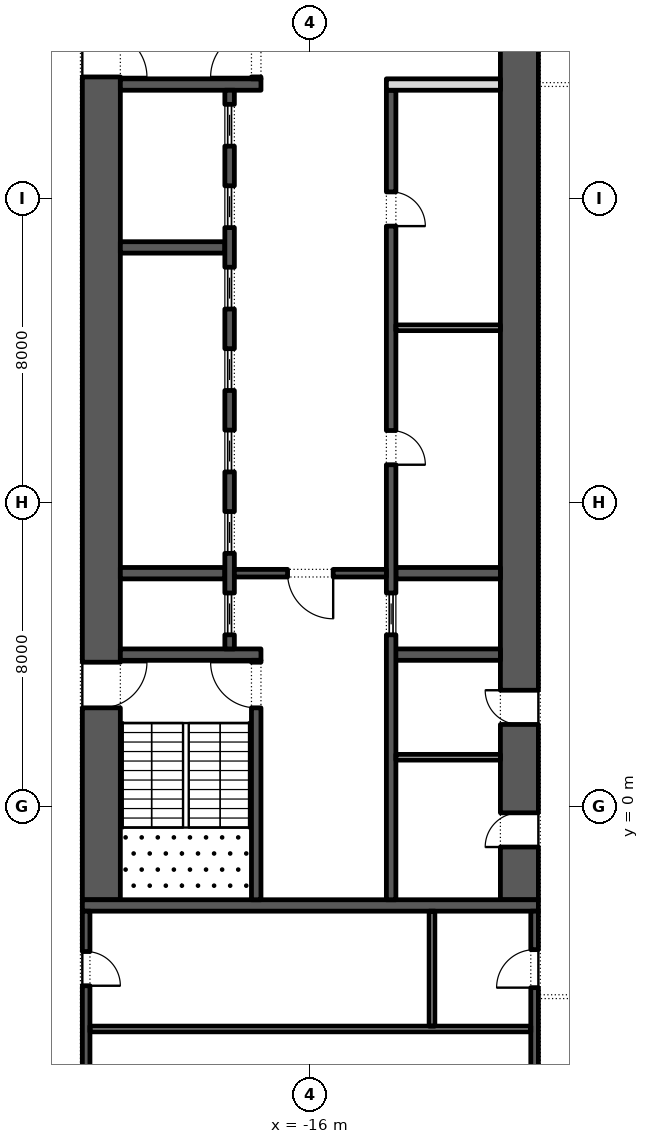
"""IFC4 building model, lengths in metres.
Left out: names, types, materials, properties, quantities, classifications, styles, units other than length and angle.
Written with IfcOpenShell. Run it as: python <this file> out.ifc"""

import sys

from ifc_helpers import new_model, si_unit, direction, frame, frame_2d, origin, place, context, subcontext, project, spatial, rectangle, extrude, element, fill, save


model = new_model("IFC4")
c1 = context("Model", 3, precision=1e-05, world=origin(), true_north=direction((0.0, 1.0)))
c2 = subcontext(c1, "Body", "Model", "MODEL_VIEW")
j1 = project(units=[si_unit("LENGTHUNIT", "METRE"), si_unit("PLANEANGLEUNIT", "RADIAN")], contexts=[c1])
p1 = place(None, origin())
s1 = spatial("IfcSite", under=j1, at=p1, CompositionType="ELEMENT")
p2 = place(p1, origin())
s2 = spatial("IfcBuilding", under=s1, at=p2, CompositionType="ELEMENT")
p3 = place(p2, frame((0.0, 0.0, 56.4)))
s3 = spatial("IfcBuildingStorey", under=s2, at=p3, CompositionType="ELEMENT", Elevation=56.4)
p4 = place(p3, frame((-21.5, -2.45, 0.0), z_axis=(0.0, 0.0, 1.0), x_axis=(0.0, 1.0, 0.0)))
e1 = element("IfcWall", 1, at=p4, inside=s3, PredefinedType="SHEAR", context=c2, shape_type="SweptSolid", body=[
    extrude(rectangle(XDim=27.9, YDim=1.0, at=frame_2d((13.95, 0.0))), origin(), (0.0, 0.0, 1.0), 4.0),
])
p5 = place(p4, frame((5.05, 0.0, 0.0)))
e2 = element("IfcOpeningElement", 2, at=p5, cuts=e1, PredefinedType="OPENING", context=c2, shape_type="SweptSolid", body=[
    extrude(rectangle(XDim=1.2, YDim=2.1, at=frame_2d((0.6, 1.05))), frame((0.0, 0.51, 0.0), z_axis=(0.0, -1.0, 0.0), x_axis=(1.0, 0.0, 0.0)), (0.0, 0.0, 1.0), 1.02),
])
p6 = place(p4, frame((21.65, 0.0, 0.0)))
e3 = element("IfcOpeningElement", 3, at=p6, cuts=e1, PredefinedType="OPENING", context=c2, shape_type="SweptSolid", body=[
    extrude(rectangle(XDim=1.2, YDim=2.1, at=frame_2d((0.6, 1.05))), frame((0.0, 0.51, 0.0), z_axis=(0.0, -1.0, 0.0), x_axis=(1.0, 0.0, 0.0)), (0.0, 0.0, 1.0), 1.02),
])
p7 = place(p3, frame((-10.5, -2.45, 0.0), z_axis=(0.0, 0.0, 1.0), x_axis=(0.0, 1.0, 0.0)))
e4 = element("IfcWall", 4, at=p7, inside=s3, PredefinedType="SHEAR", context=c2, shape_type="SweptSolid", body=[
    extrude(rectangle(XDim=27.9, YDim=1.0, at=frame_2d((13.95, 0.0))), origin(), (0.0, 0.0, 1.0), 4.0),
])
p8 = place(p7, frame((23.65, 0.0, 0.0)))
e5 = element("IfcOpeningElement", 5, at=p8, cuts=e4, PredefinedType="OPENING", context=c2, shape_type="SweptSolid", body=[
    extrude(rectangle(XDim=2.4, YDim=2.1, at=frame_2d((1.2, 1.05))), frame((0.0, 0.51, 0.0), z_axis=(0.0, -1.0, 0.0), x_axis=(1.0, 0.0, 0.0)), (0.0, 0.0, 1.0), 1.02),
])
p9 = place(p7, frame((1.387, 0.0, 0.0)))
e6 = element("IfcOpeningElement", 6, at=p9, cuts=e4, PredefinedType="OPENING", context=c2, shape_type="SweptSolid", body=[
    extrude(rectangle(XDim=0.9, YDim=2.1, at=frame_2d((0.45, 1.05))), frame((0.0, 0.51, 0.0), z_axis=(0.0, -1.0, 0.0), x_axis=(1.0, 0.0, 0.0)), (0.0, 0.0, 1.0), 1.02),
])
p10 = place(p7, frame((4.613, 0.0, 0.0)))
e7 = element("IfcOpeningElement", 7, at=p10, cuts=e4, PredefinedType="OPENING", context=c2, shape_type="SweptSolid", body=[
    extrude(rectangle(XDim=0.9, YDim=2.1, at=frame_2d((0.45, 1.05))), frame((0.0, 0.51, 0.0), z_axis=(0.0, -1.0, 0.0), x_axis=(1.0, 0.0, 0.0)), (0.0, 0.0, 1.0), 1.02),
])
p11 = place(p3, frame((-22.0, -2.6, 0.0), z_axis=(0.0, 0.0, 1.0), x_axis=(1.0, 0.0, 0.0)))
e8 = element("IfcWall", 8, at=p11, inside=s3, PredefinedType="SHEAR", context=c2, shape_type="SweptSolid", body=[
    extrude(rectangle(XDim=12.0, YDim=0.3, at=frame_2d((6.0, 0.0))), origin(), (0.0, 0.0, 1.0), 4.0),
])
p12 = place(p3, frame((-21.0, 4.0, 0.0), z_axis=(0.0, 0.0, 1.0), x_axis=(1.0, 0.0, 0.0)))
e9 = element("IfcWall", 9, at=p12, inside=s3, PredefinedType="SHEAR", context=c2, shape_type="SweptSolid", body=[
    extrude(rectangle(XDim=3.7, YDim=0.3, at=frame_2d((1.85, 0.0))), origin(), (0.0, 0.0, 1.0), 4.0),
])
p13 = place(p3, frame((-17.425, -2.45, 0.0), z_axis=(0.0, 0.0, 1.0), x_axis=(0.0, 1.0, 0.0)))
e10 = element("IfcWall", 10, at=p13, inside=s3, PredefinedType="SHEAR", context=c2, shape_type="SweptSolid", body=[
    extrude(rectangle(XDim=6.3, YDim=0.25, at=frame_2d((3.15, 0.0))), origin(), (0.0, 0.0, 1.0), 4.0),
])
p14 = place(p13, frame((5.05, 0.0, 0.0)))
e11 = element("IfcOpeningElement", 11, at=p14, cuts=e10, PredefinedType="OPENING", context=c2, shape_type="SweptSolid", body=[
    extrude(rectangle(XDim=1.2, YDim=2.1, at=frame_2d((0.6, 1.05))), frame((0.0, 0.135, 0.0), z_axis=(0.0, -1.0, 0.0), x_axis=(1.0, 0.0, 0.0)), (0.0, 0.0, 1.0), 0.27),
])
p15 = place(p3, frame((-21.0, 19.0, 0.0), z_axis=(0.0, 0.0, 1.0), x_axis=(1.0, 0.0, 0.0)))
e12 = element("IfcWall", 12, at=p15, inside=s3, PredefinedType="SHEAR", context=c2, shape_type="SweptSolid", body=[
    extrude(rectangle(XDim=3.7, YDim=0.3, at=frame_2d((1.85, 0.0))), origin(), (0.0, 0.0, 1.0), 4.0),
])
p16 = place(p3, frame((-17.425, 19.15, 0.0), z_axis=(0.0, 0.0, 1.0), x_axis=(0.0, 1.0, 0.0)))
e13 = element("IfcWall", 13, at=p16, inside=s3, PredefinedType="SHEAR", context=c2, shape_type="SweptSolid", body=[
    extrude(rectangle(XDim=6.3, YDim=0.25, at=frame_2d((3.15, 0.0))), origin(), (0.0, 0.0, 1.0), 4.0),
])
p17 = place(p16, frame((0.05, 0.0, 0.0)))
e14 = element("IfcOpeningElement", 14, at=p17, cuts=e13, PredefinedType="OPENING", context=c2, shape_type="SweptSolid", body=[
    extrude(rectangle(XDim=1.2, YDim=2.1, at=frame_2d((0.6, 1.05))), frame((0.0, 0.135, 0.0), z_axis=(0.0, -1.0, 0.0), x_axis=(1.0, 0.0, 0.0)), (0.0, 0.0, 1.0), 0.27),
])
for number, where, z_axis, x_axis in (
    (15, (-21.0, 6.143, 0.0), (0.0, 0.0, 1.0), (1.0, 0.0, 0.0)),
    (16, (-21.0, 14.714, 0.0), (0.0, 0.0, 1.0), (1.0, 0.0, 0.0)),
):
    element("IfcWall", number, at=place(p3, frame(where, z_axis=z_axis, x_axis=x_axis)), inside=s3, PredefinedType="SHEAR", context=c2, shape_type="SweptSolid", body=[
        extrude(rectangle(XDim=2.75, YDim=0.3, at=frame_2d((1.375, 0.0))), origin(), (0.0, 0.0, 1.0), 4.0),
    ])
p18 = place(p3, frame((-18.125, 4.15, 0.0), z_axis=(0.0, 0.0, 1.0), x_axis=(0.0, 1.0, 0.0)))
e17 = element("IfcWall", 17, at=p18, inside=s3, PredefinedType="SHEAR", context=c2, shape_type="SweptSolid", body=[
    extrude(rectangle(XDim=14.7, YDim=0.25, at=frame_2d((7.35, 0.0))), origin(), (0.0, 0.0, 1.0), 4.0),
])
p19 = place(p18, frame((0.371, 0.0, 0.0)))
e18 = element("IfcOpeningElement", 18, at=p19, cuts=e17, PredefinedType="OPENING", context=c2, shape_type="SweptSolid", body=[
    extrude(rectangle(XDim=1.1, YDim=2.1, at=frame_2d((0.55, 1.05))), frame((0.0, 0.135, 0.0), z_axis=(0.0, -1.0, 0.0), x_axis=(1.0, 0.0, 0.0)), (0.0, 0.0, 1.0), 0.27),
])
p20 = place(p18, frame((2.514, 0.0, 0.0)))
e19 = element("IfcOpeningElement", 19, at=p20, cuts=e17, PredefinedType="OPENING", context=c2, shape_type="SweptSolid", body=[
    extrude(rectangle(XDim=1.1, YDim=2.1, at=frame_2d((0.55, 1.05))), frame((0.0, 0.135, 0.0), z_axis=(0.0, -1.0, 0.0), x_axis=(1.0, 0.0, 0.0)), (0.0, 0.0, 1.0), 0.27),
])
p21 = place(p18, frame((4.657, 0.0, 0.0)))
e20 = element("IfcOpeningElement", 20, at=p21, cuts=e17, PredefinedType="OPENING", context=c2, shape_type="SweptSolid", body=[
    extrude(rectangle(XDim=1.1, YDim=2.1, at=frame_2d((0.55, 1.05))), frame((0.0, 0.135, 0.0), z_axis=(0.0, -1.0, 0.0), x_axis=(1.0, 0.0, 0.0)), (0.0, 0.0, 1.0), 0.27),
])
p22 = place(p18, frame((6.8, 0.0, 0.0)))
e21 = element("IfcOpeningElement", 21, at=p22, cuts=e17, PredefinedType="OPENING", context=c2, shape_type="SweptSolid", body=[
    extrude(rectangle(XDim=1.1, YDim=2.1, at=frame_2d((0.55, 1.05))), frame((0.0, 0.135, 0.0), z_axis=(0.0, -1.0, 0.0), x_axis=(1.0, 0.0, 0.0)), (0.0, 0.0, 1.0), 0.27),
])
p23 = place(p18, frame((8.943, 0.0, 0.0)))
e22 = element("IfcOpeningElement", 22, at=p23, cuts=e17, PredefinedType="OPENING", context=c2, shape_type="SweptSolid", body=[
    extrude(rectangle(XDim=1.1, YDim=2.1, at=frame_2d((0.55, 1.05))), frame((0.0, 0.135, 0.0), z_axis=(0.0, -1.0, 0.0), x_axis=(1.0, 0.0, 0.0)), (0.0, 0.0, 1.0), 0.27),
])
p24 = place(p18, frame((11.086, 0.0, 0.0)))
e23 = element("IfcOpeningElement", 23, at=p24, cuts=e17, PredefinedType="OPENING", context=c2, shape_type="SweptSolid", body=[
    extrude(rectangle(XDim=1.1, YDim=2.1, at=frame_2d((0.55, 1.05))), frame((0.0, 0.135, 0.0), z_axis=(0.0, -1.0, 0.0), x_axis=(1.0, 0.0, 0.0)), (0.0, 0.0, 1.0), 0.27),
])
p25 = place(p18, frame((13.229, 0.0, 0.0)))
e24 = element("IfcOpeningElement", 24, at=p25, cuts=e17, PredefinedType="OPENING", context=c2, shape_type="SweptSolid", body=[
    extrude(rectangle(XDim=1.1, YDim=2.1, at=frame_2d((0.55, 1.05))), frame((0.0, 0.135, 0.0), z_axis=(0.0, -1.0, 0.0), x_axis=(1.0, 0.0, 0.0)), (0.0, 0.0, 1.0), 0.27),
])
p26 = place(p3, frame((-14.0, 4.0, 0.0), z_axis=(0.0, 0.0, 1.0), x_axis=(1.0, 0.0, 0.0)))
e25 = element("IfcWall", 25, at=p26, inside=s3, PredefinedType="SHEAR", context=c2, shape_type="SweptSolid", body=[
    extrude(rectangle(XDim=3.0, YDim=0.3, at=frame_2d((1.5, 0.0))), origin(), (0.0, 0.0, 1.0), 4.0),
])
p27 = place(p3, frame((-13.75, 6.143, 0.0), z_axis=(0.0, 0.0, 1.0), x_axis=(1.0, 0.0, 0.0)))
e26 = element("IfcWall", 26, at=p27, inside=s3, PredefinedType="SHEAR", context=c2, shape_type="SweptSolid", body=[
    extrude(rectangle(XDim=2.75, YDim=0.3, at=frame_2d((1.375, 0.0))), origin(), (0.0, 0.0, 1.0), 4.0),
])
p28 = place(p3, frame((-13.875, -2.45, 0.0), z_axis=(0.0, 0.0, 1.0), x_axis=(0.0, 1.0, 0.0)))
e27 = element("IfcWall", 27, at=p28, inside=s3, PredefinedType="SHEAR", context=c2, shape_type="SweptSolid", body=[
    extrude(rectangle(XDim=21.3, YDim=0.25, at=frame_2d((10.65, 0.0))), origin(), (0.0, 0.0, 1.0), 4.0),
])
p29 = place(p28, frame((11.446, 0.0, 0.0)))
e28 = element("IfcOpeningElement", 28, at=p29, cuts=e27, PredefinedType="OPENING", context=c2, shape_type="SweptSolid", body=[
    extrude(rectangle(XDim=0.9, YDim=2.1, at=frame_2d((0.45, 1.05))), frame((0.0, 0.135, 0.0), z_axis=(0.0, -1.0, 0.0), x_axis=(1.0, 0.0, 0.0)), (0.0, 0.0, 1.0), 0.27),
])
p30 = place(p28, frame((17.725, 0.0, 0.0)))
e29 = element("IfcOpeningElement", 29, at=p30, cuts=e27, PredefinedType="OPENING", context=c2, shape_type="SweptSolid", body=[
    extrude(rectangle(XDim=0.9, YDim=2.1, at=frame_2d((0.45, 1.05))), frame((0.0, 0.135, 0.0), z_axis=(0.0, -1.0, 0.0), x_axis=(1.0, 0.0, 0.0)), (0.0, 0.0, 1.0), 0.27),
])
p31 = place(p28, frame((6.971, 0.0, 0.0)))
e30 = element("IfcOpeningElement", 30, at=p31, cuts=e27, PredefinedType="OPENING", context=c2, shape_type="SweptSolid", body=[
    extrude(rectangle(XDim=1.1, YDim=2.1, at=frame_2d((0.55, 1.05))), frame((0.0, 0.135, 0.0), z_axis=(0.0, -1.0, 0.0), x_axis=(1.0, 0.0, 0.0)), (0.0, 0.0, 1.0), 0.27),
])
p32 = place(p3, frame((-14.0, 19.0, 0.0), z_axis=(0.0, 0.0, 1.0), x_axis=(1.0, 0.0, 0.0)))
e31 = element("IfcWall", 31, at=p32, inside=s3, PredefinedType="PARTITIONING", context=c2, shape_type="SweptSolid", body=[
    extrude(rectangle(XDim=3.0, YDim=0.3, at=frame_2d((1.5, 0.0))), origin(), (0.0, 0.0, 1.0), 4.0),
])
p33 = place(p3, frame((-13.75, 12.6, 0.0), z_axis=(0.0, 0.0, 1.0), x_axis=(1.0, 0.0, 0.0)))
e32 = element("IfcWall", 32, at=p33, inside=s3, PredefinedType="PARTITIONING", context=c2, shape_type="SweptSolid", body=[
    extrude(rectangle(XDim=2.75, YDim=0.15, at=frame_2d((1.375, 0.0))), origin(), (0.0, 0.0, 1.0), 4.0),
])
p34 = place(p3, frame((-18.0, 6.143, 0.0), z_axis=(0.0, 0.0, 1.0), x_axis=(1.0, 0.0, 0.0)))
e33 = element("IfcWall", 33, at=p34, inside=s3, PredefinedType="SHEAR", context=c2, shape_type="SweptSolid", body=[
    extrude(rectangle(XDim=4.0, YDim=0.2, at=frame_2d((2.0, 0.0))), origin(), (0.0, 0.0, 1.0), 4.0),
])
p35 = place(p34, frame((1.4, 0.0, 0.0)))
e34 = element("IfcOpeningElement", 34, at=p35, cuts=e33, PredefinedType="OPENING", context=c2, shape_type="SweptSolid", body=[
    extrude(rectangle(XDim=1.2, YDim=2.1, at=frame_2d((0.6, 1.05))), frame((0.0, 0.11, 0.0), z_axis=(0.0, -1.0, 0.0), x_axis=(1.0, 0.0, 0.0)), (0.0, 0.0, 1.0), 0.22),
])
p36 = place(p3, frame((-13.75, 1.3, 0.0), z_axis=(0.0, 0.0, 1.0), x_axis=(1.0, 0.0, 0.0)))
e35 = element("IfcWall", 35, at=p36, inside=s3, PredefinedType="PARTITIONING", context=c2, shape_type="SweptSolid", body=[
    extrude(rectangle(XDim=2.75, YDim=0.15, at=frame_2d((1.375, 0.0))), origin(), (0.0, 0.0, 1.0), 4.0),
])
p37 = place(p3, frame((-21.9, -15.8, 0.0), z_axis=(0.0, 0.0, 1.0), x_axis=(0.0, 1.0, 0.0)))
e36 = element("IfcWall", 36, at=p37, inside=s3, PredefinedType="SHEAR", context=c2, shape_type="SweptSolid", body=[
    extrude(rectangle(XDim=13.05, YDim=0.2, at=frame_2d((6.525, 0.0))), origin(), (0.0, 0.0, 1.0), 4.0),
])
p38 = place(p37, frame((11.087, 0.0, 0.0)))
e37 = element("IfcOpeningElement", 37, at=p38, cuts=e36, PredefinedType="OPENING", context=c2, shape_type="SweptSolid", body=[
    extrude(rectangle(XDim=0.9, YDim=2.1, at=frame_2d((0.45, 1.05))), frame((0.0, 0.11, 0.0), z_axis=(0.0, -1.0, 0.0), x_axis=(1.0, 0.0, 0.0)), (0.0, 0.0, 1.0), 0.22),
])
p39 = place(p3, frame((-10.1, -15.8, 0.0), z_axis=(0.0, 0.0, 1.0), x_axis=(0.0, 1.0, 0.0)))
e38 = element("IfcWall", 38, at=p39, inside=s3, PredefinedType="SHEAR", context=c2, shape_type="SweptSolid", body=[
    extrude(rectangle(XDim=13.05, YDim=0.2, at=frame_2d((6.525, 0.0))), origin(), (0.0, 0.0, 1.0), 4.0),
])
p40 = place(p39, frame((4.488, 0.0, 0.0)))
e39 = element("IfcOpeningElement", 39, at=p40, cuts=e38, PredefinedType="OPENING", context=c2, shape_type="SweptSolid", body=[
    extrude(rectangle(XDim=0.9, YDim=2.1, at=frame_2d((0.45, 1.05))), frame((0.0, 0.11, 0.0), z_axis=(0.0, -1.0, 0.0), x_axis=(1.0, 0.0, 0.0)), (0.0, 0.0, 1.0), 0.22),
])
p41 = place(p39, frame((11.038, 0.0, 0.0)))
e40 = element("IfcOpeningElement", 40, at=p41, cuts=e38, PredefinedType="OPENING", context=c2, shape_type="SweptSolid", body=[
    extrude(rectangle(XDim=1.0, YDim=2.1, at=frame_2d((0.5, 1.05))), frame((0.0, 0.11, 0.0), z_axis=(0.0, -1.0, 0.0), x_axis=(1.0, 0.0, 0.0)), (0.0, 0.0, 1.0), 0.22),
])
p42 = place(p3, frame((-21.8, -5.85, 0.0), z_axis=(0.0, 0.0, 1.0), x_axis=(1.0, 0.0, 0.0)))
e41 = element("IfcWall", 41, at=p42, inside=s3, PredefinedType="PARTITIONING", context=c2, shape_type="SweptSolid", body=[
    extrude(rectangle(XDim=11.6, YDim=0.15, at=frame_2d((5.8, 0.0))), origin(), (0.0, 0.0, 1.0), 4.0),
])
p43 = place(p3, frame((-12.8, -5.775, 0.0), z_axis=(0.0, 0.0, 1.0), x_axis=(0.0, 1.0, 0.0)))
e42 = element("IfcWall", 42, at=p43, inside=s3, PredefinedType="PARTITIONING", context=c2, shape_type="SweptSolid", body=[
    extrude(rectangle(XDim=3.025, YDim=0.15, at=frame_2d((1.512, 0.0))), origin(), (0.0, 0.0, 1.0), 4.0),
])
p44 = place(p19, origin())
e43 = element("IfcDoor", 43, at=p44, inside=s3, OperationType="SLIDING_TO_LEFT", PredefinedType="DOOR", context=c2, shape_type="SweptSolid", body=[
    extrude(rectangle(XDim=1.1, YDim=2.1, at=frame_2d((0.55, 1.05))), frame((0.0, 0.025, 0.0), z_axis=(0.0, -1.0, 0.0), x_axis=(1.0, 0.0, 0.0)), (0.0, 0.0, 1.0), 0.05),
])
fill(e18, e43)
p45 = place(p20, origin())
e44 = element("IfcDoor", 44, at=p45, inside=s3, OperationType="SLIDING_TO_LEFT", PredefinedType="DOOR", context=c2, shape_type="SweptSolid", body=[
    extrude(rectangle(XDim=1.1, YDim=2.1, at=frame_2d((0.55, 1.05))), frame((0.0, 0.025, 0.0), z_axis=(0.0, -1.0, 0.0), x_axis=(1.0, 0.0, 0.0)), (0.0, 0.0, 1.0), 0.05),
])
fill(e19, e44)
p46 = place(p21, origin())
e45 = element("IfcDoor", 45, at=p46, inside=s3, OperationType="SLIDING_TO_LEFT", PredefinedType="DOOR", context=c2, shape_type="SweptSolid", body=[
    extrude(rectangle(XDim=1.1, YDim=2.1, at=frame_2d((0.55, 1.05))), frame((0.0, 0.025, 0.0), z_axis=(0.0, -1.0, 0.0), x_axis=(1.0, 0.0, 0.0)), (0.0, 0.0, 1.0), 0.05),
])
fill(e20, e45)
p47 = place(p22, origin())
e46 = element("IfcDoor", 46, at=p47, inside=s3, OperationType="SLIDING_TO_LEFT", PredefinedType="DOOR", context=c2, shape_type="SweptSolid", body=[
    extrude(rectangle(XDim=1.1, YDim=2.1, at=frame_2d((0.55, 1.05))), frame((0.0, 0.025, 0.0), z_axis=(0.0, -1.0, 0.0), x_axis=(1.0, 0.0, 0.0)), (0.0, 0.0, 1.0), 0.05),
])
fill(e21, e46)
p48 = place(p23, origin())
e47 = element("IfcDoor", 47, at=p48, inside=s3, OperationType="SLIDING_TO_LEFT", PredefinedType="DOOR", context=c2, shape_type="SweptSolid", body=[
    extrude(rectangle(XDim=1.1, YDim=2.1, at=frame_2d((0.55, 1.05))), frame((0.0, 0.025, 0.0), z_axis=(0.0, -1.0, 0.0), x_axis=(1.0, 0.0, 0.0)), (0.0, 0.0, 1.0), 0.05),
])
fill(e22, e47)
p49 = place(p24, origin())
e48 = element("IfcDoor", 48, at=p49, inside=s3, OperationType="SLIDING_TO_LEFT", PredefinedType="DOOR", context=c2, shape_type="SweptSolid", body=[
    extrude(rectangle(XDim=1.1, YDim=2.1, at=frame_2d((0.55, 1.05))), frame((0.0, 0.025, 0.0), z_axis=(0.0, -1.0, 0.0), x_axis=(1.0, 0.0, 0.0)), (0.0, 0.0, 1.0), 0.05),
])
fill(e23, e48)
p50 = place(p25, origin())
e49 = element("IfcDoor", 49, at=p50, inside=s3, OperationType="SLIDING_TO_LEFT", PredefinedType="DOOR", context=c2, shape_type="SweptSolid", body=[
    extrude(rectangle(XDim=1.1, YDim=2.1, at=frame_2d((0.55, 1.05))), frame((0.0, 0.025, 0.0), z_axis=(0.0, -1.0, 0.0), x_axis=(1.0, 0.0, 0.0)), (0.0, 0.0, 1.0), 0.05),
])
fill(e24, e49)
p51 = place(p29, frame((0.9, -0.2, 0.0), z_axis=(0.0, 0.0, 1.0), x_axis=(-1.0, 0.0, 0.0)))
e50 = element("IfcDoor", 50, at=p51, inside=s3, OperationType="SINGLE_SWING_LEFT", PredefinedType="DOOR", context=c2, shape_type="SweptSolid", body=[
    extrude(rectangle(XDim=0.9, YDim=2.1, at=frame_2d((0.45, 1.05))), frame((0.0, -0.075, 0.0), z_axis=(0.0, -1.0, 0.0), x_axis=(1.0, 0.0, 0.0)), (0.0, 0.0, 1.0), 0.05),
])
fill(e28, e50)
p52 = place(p30, frame((0.9, -0.2, 0.0), z_axis=(0.0, 0.0, 1.0), x_axis=(-1.0, 0.0, 0.0)))
e51 = element("IfcDoor", 51, at=p52, inside=s3, OperationType="SINGLE_SWING_LEFT", PredefinedType="DOOR", context=c2, shape_type="SweptSolid", body=[
    extrude(rectangle(XDim=0.9, YDim=2.1, at=frame_2d((0.45, 1.05))), frame((0.0, -0.075, 0.0), z_axis=(0.0, -1.0, 0.0), x_axis=(1.0, 0.0, 0.0)), (0.0, 0.0, 1.0), 0.05),
])
fill(e29, e51)
p53 = place(p31, origin())
e52 = element("IfcDoor", 52, at=p53, inside=s3, OperationType="SLIDING_TO_LEFT", PredefinedType="DOOR", context=c2, shape_type="SweptSolid", body=[
    extrude(rectangle(XDim=1.1, YDim=2.1, at=frame_2d((0.55, 1.05))), frame((0.0, 0.025, 0.0), z_axis=(0.0, -1.0, 0.0), x_axis=(1.0, 0.0, 0.0)), (0.0, 0.0, 1.0), 0.05),
])
fill(e30, e52)
p54 = place(p35, frame((1.2, 0.0, 0.0), z_axis=(0.0, 0.0, 1.0), x_axis=(-1.0, 0.0, 0.0)))
e53 = element("IfcDoor", 53, at=p54, inside=s3, OperationType="SINGLE_SWING_RIGHT", PredefinedType="DOOR", context=c2, shape_type="SweptSolid", body=[
    extrude(rectangle(XDim=1.2, YDim=2.1, at=frame_2d((0.6, 1.05))), frame((0.0, 0.025, 0.0), z_axis=(0.0, -1.0, 0.0), x_axis=(1.0, 0.0, 0.0)), (0.0, 0.0, 1.0), 0.05),
])
fill(e34, e53)
p55 = place(p14, origin())
e54 = element("IfcDoor", 54, at=p55, inside=s3, OperationType="SINGLE_SWING_LEFT", PredefinedType="DOOR", context=c2, shape_type="SweptSolid", body=[
    extrude(rectangle(XDim=1.2, YDim=2.1, at=frame_2d((0.6, 1.05))), frame((0.0, 0.025, 0.0), z_axis=(0.0, -1.0, 0.0), x_axis=(1.0, 0.0, 0.0)), (0.0, 0.0, 1.0), 0.05),
])
fill(e11, e54)
p56 = place(p5, frame((1.2, 0.0, 0.0), z_axis=(0.0, 0.0, 1.0), x_axis=(-1.0, 0.0, 0.0)))
e55 = element("IfcDoor", 55, at=p56, inside=s3, OperationType="SINGLE_SWING_RIGHT", PredefinedType="DOOR", context=c2, shape_type="SweptSolid", body=[
    extrude(rectangle(XDim=1.2, YDim=2.1, at=frame_2d((0.6, 1.05))), frame((0.0, 0.025, 0.0), z_axis=(0.0, -1.0, 0.0), x_axis=(1.0, 0.0, 0.0)), (0.0, 0.0, 1.0), 0.05),
])
fill(e2, e55)
p57 = place(p17, origin())
e56 = element("IfcDoor", 56, at=p57, inside=s3, OperationType="SINGLE_SWING_RIGHT", PredefinedType="DOOR", context=c2, shape_type="SweptSolid", body=[
    extrude(rectangle(XDim=1.2, YDim=2.1, at=frame_2d((0.6, 1.05))), frame((0.0, 0.025, 0.0), z_axis=(0.0, -1.0, 0.0), x_axis=(1.0, 0.0, 0.0)), (0.0, 0.0, 1.0), 0.05),
])
fill(e14, e56)
p58 = place(p6, frame((1.2, 0.0, 0.0), z_axis=(0.0, 0.0, 1.0), x_axis=(-1.0, 0.0, 0.0)))
e57 = element("IfcDoor", 57, at=p58, inside=s3, OperationType="SINGLE_SWING_LEFT", PredefinedType="DOOR", context=c2, shape_type="SweptSolid", body=[
    extrude(rectangle(XDim=1.2, YDim=2.1, at=frame_2d((0.6, 1.05))), frame((0.0, 0.025, 0.0), z_axis=(0.0, -1.0, 0.0), x_axis=(1.0, 0.0, 0.0)), (0.0, 0.0, 1.0), 0.05),
])
fill(e3, e57)
p59 = place(p9, origin())
e58 = element("IfcDoor", 58, at=p59, inside=s3, OperationType="SINGLE_SWING_RIGHT", PredefinedType="DOOR", context=c2, shape_type="SweptSolid", body=[
    extrude(rectangle(XDim=0.9, YDim=2.1, at=frame_2d((0.45, 1.05))), frame((0.0, 0.5, 0.0), z_axis=(0.0, -1.0, 0.0), x_axis=(1.0, 0.0, 0.0)), (0.0, 0.0, 1.0), 0.05),
])
fill(e6, e58)
p60 = place(p10, origin())
e59 = element("IfcDoor", 59, at=p60, inside=s3, OperationType="SINGLE_SWING_LEFT", PredefinedType="DOOR", context=c2, shape_type="SweptSolid", body=[
    extrude(rectangle(XDim=0.9, YDim=2.1, at=frame_2d((0.45, 1.05))), frame((0.0, 0.5, 0.0), z_axis=(0.0, -1.0, 0.0), x_axis=(1.0, 0.0, 0.0)), (0.0, 0.0, 1.0), 0.05),
])
fill(e7, e59)
p61 = place(p41, origin())
e60 = element("IfcDoor", 60, at=p61, inside=s3, OperationType="SINGLE_SWING_RIGHT", PredefinedType="DOOR", context=c2, shape_type="SweptSolid", body=[
    extrude(rectangle(XDim=1.0, YDim=2.1, at=frame_2d((0.5, 1.05))), frame((0.0, 0.1, 0.0), z_axis=(0.0, -1.0, 0.0), x_axis=(1.0, 0.0, 0.0)), (0.0, 0.0, 1.0), 0.05),
])
fill(e40, e60)
p62 = place(p38, frame((0.9, -0.15, 0.0), z_axis=(0.0, 0.0, 1.0), x_axis=(-1.0, 0.0, 0.0)))
e61 = element("IfcDoor", 61, at=p62, inside=s3, OperationType="SINGLE_SWING_LEFT", PredefinedType="DOOR", context=c2, shape_type="SweptSolid", body=[
    extrude(rectangle(XDim=0.9, YDim=2.1, at=frame_2d((0.45, 1.05))), frame((0.0, -0.05, 0.0), z_axis=(0.0, -1.0, 0.0), x_axis=(1.0, 0.0, 0.0)), (0.0, 0.0, 1.0), 0.05),
])
fill(e37, e61)
save(model, sys.argv[1])
